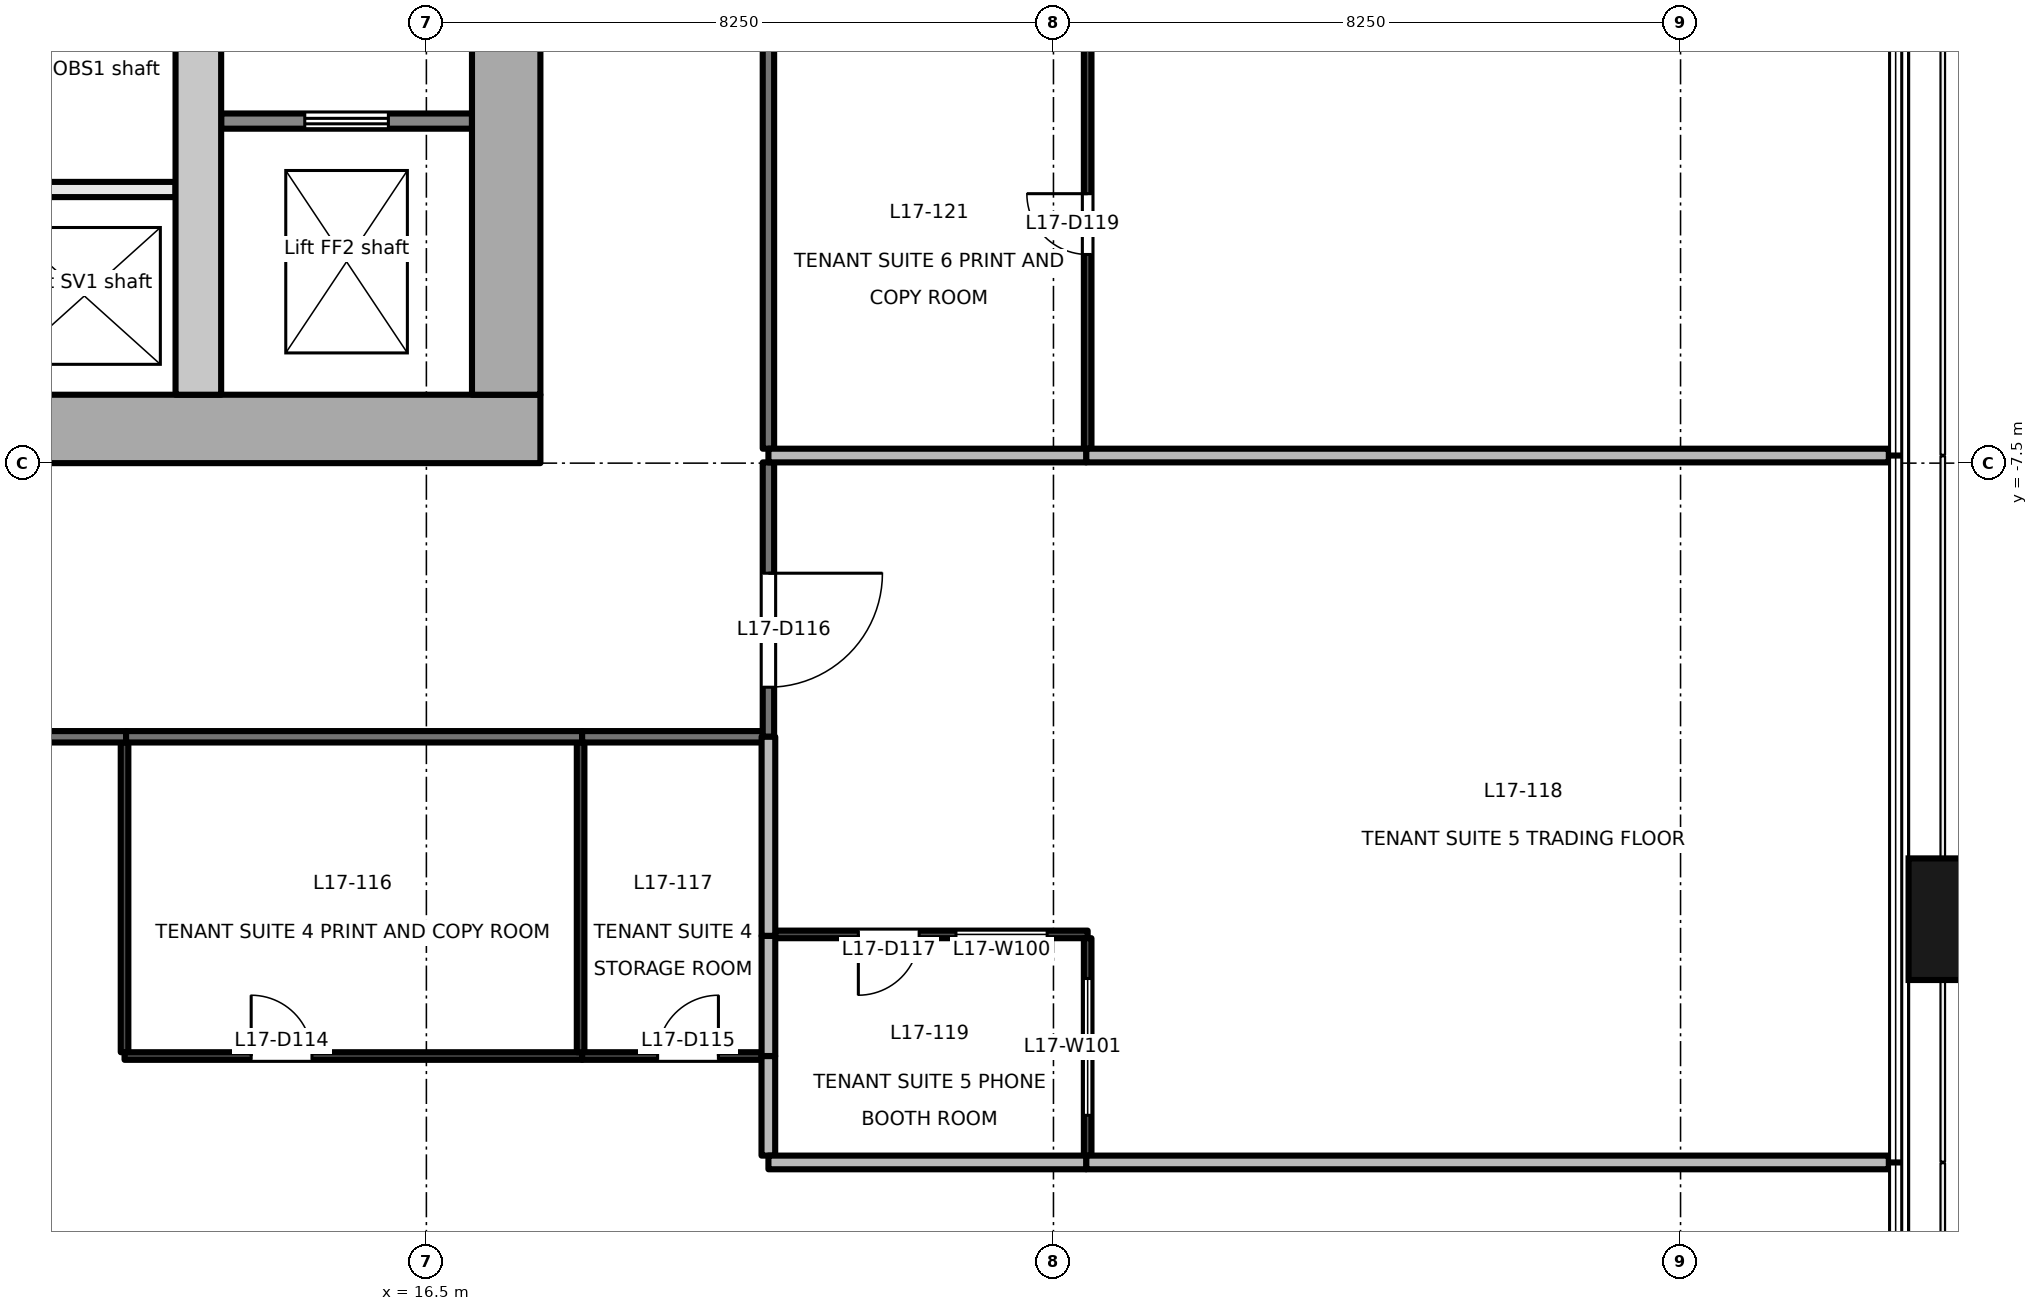
"""IFC4 building model, lengths in metres.
Left out: names, types, materials, properties, quantities, classifications, styles, units other than length and angle.
Written with IfcOpenShell. Run it as: python <this file> out.ifc"""

import sys

from ifc_helpers import new_model, si_unit, direction, frame, frame_2d, origin, origin_2d, place, context, subcontext, project, spatial, rectangle, extrude, element, fill, save


model = new_model("IFC4")
c1 = context("Model", 3, precision=1e-05, world=origin(), true_north=direction((0.0, 1.0)))
c2 = subcontext(c1, "Body", "Model", "MODEL_VIEW")
j1 = project(units=[si_unit("LENGTHUNIT", "METRE"), si_unit("PLANEANGLEUNIT", "RADIAN")], contexts=[c1])
p1 = place(None, origin())
s1 = spatial("IfcSite", under=j1, at=p1, CompositionType="ELEMENT")
p2 = place(p1, origin())
s2 = spatial("IfcBuilding", under=s1, at=p2, CompositionType="ELEMENT")
p3 = place(p2, frame((0.0, 0.0, 79.7)))
s3 = spatial("IfcBuildingStorey", under=s2, at=p3, CompositionType="ELEMENT", Elevation=79.7)
p4 = place(p3, frame((36.9, -13.5, -0.2), z_axis=(0.0, 0.0, 1.0), x_axis=(0.0, 1.0, 0.0)))
e1 = element("IfcColumn", 1, at=p4, inside=s3, PredefinedType="COLUMN", context=c2, shape_type="SweptSolid", body=[
    extrude(rectangle(XDim=1.6, YDim=1.8, at=origin_2d()), origin(), (0.0, 0.0, 1.0), 4.0),
])
p5 = place(p3, frame((-18.0, -7.05, -0.2), z_axis=(0.0, 0.0, 1.0), x_axis=(1.0, 0.0, 0.0)))
e2 = element("IfcWall", 2, at=p5, inside=s3, PredefinedType="SHEAR", context=c2, shape_type="SweptSolid", body=[
    extrude(rectangle(XDim=36.0, YDim=0.9, at=frame_2d((18.0, 0.0))), origin(), (0.0, 0.0, 1.0), 4.0),
])
p6 = place(p5, frame((7.8, 0.0, 0.2)))
e3 = element("IfcOpeningElement", 3, at=p6, cuts=e2, PredefinedType="OPENING", context=c2, shape_type="SweptSolid", body=[
    extrude(rectangle(XDim=2.4, YDim=2.1, at=frame_2d((1.2, 1.05))), frame((0.0, 0.46, 0.0), z_axis=(0.0, -1.0, 0.0), x_axis=(1.0, 0.0, 0.0)), (0.0, 0.0, 1.0), 0.921),
])
p7 = place(p5, frame((17.4, 0.0, 0.2)))
e4 = element("IfcOpeningElement", 4, at=p7, cuts=e2, PredefinedType="OPENING", context=c2, shape_type="SweptSolid", body=[
    extrude(rectangle(XDim=1.2, YDim=2.1, at=frame_2d((0.6, 1.05))), frame((0.0, 0.46, 0.0), z_axis=(0.0, -1.0, 0.0), x_axis=(1.0, 0.0, 0.0)), (0.0, 0.0, 1.0), 0.921),
])
p8 = place(p5, frame((26.1, 0.0, 0.2)))
e5 = element("IfcOpeningElement", 5, at=p8, cuts=e2, PredefinedType="OPENING", context=c2, shape_type="SweptSolid", body=[
    extrude(rectangle(XDim=2.4, YDim=2.1, at=frame_2d((1.2, 1.05))), frame((0.0, 0.46, 0.0), z_axis=(0.0, -1.0, 0.0), x_axis=(1.0, 0.0, 0.0)), (0.0, 0.0, 1.0), 0.921),
])
p9 = place(p3, frame((17.55, -6.6, -0.2), z_axis=(0.0, 0.0, 1.0), x_axis=(0.0, 1.0, 0.0)))
e6 = element("IfcWall", 6, at=p9, inside=s3, PredefinedType="SHEAR", context=c2, shape_type="SweptSolid", body=[
    extrude(rectangle(XDim=13.2, YDim=0.9, at=frame_2d((6.6, 0.0))), origin(), (0.0, 0.0, 1.0), 4.0),
])
p10 = place(p9, frame((4.55, 0.0, 0.2)))
e7 = element("IfcOpeningElement", 7, at=p10, cuts=e6, PredefinedType="OPENING", context=c2, shape_type="SweptSolid", body=[
    extrude(rectangle(XDim=1.2, YDim=2.1, at=frame_2d((0.6, 1.05))), frame((0.0, 0.46, 0.0), z_axis=(0.0, -1.0, 0.0), x_axis=(1.0, 0.0, 0.0)), (0.0, 0.0, 1.0), 0.921),
])
p11 = place(p3, frame((13.5, -6.6, -0.2), z_axis=(0.0, 0.0, 1.0), x_axis=(0.0, 1.0, 0.0)))
e8 = element("IfcWall", 8, at=p11, inside=s3, PredefinedType="SHEAR", context=c2, shape_type="SweptSolid", body=[
    extrude(rectangle(XDim=13.2, YDim=0.6, at=frame_2d((6.6, 0.0))), origin(), (0.0, 0.0, 1.0), 4.0),
])
p12 = place(p3, frame((13.8, -3.0, 0.0), z_axis=(0.0, 0.0, 1.0), x_axis=(1.0, 0.0, 0.0)))
e9 = element("IfcWall", 9, at=p12, inside=s3, PredefinedType="PARTITIONING", context=c2, shape_type="SweptSolid", body=[
    extrude(rectangle(XDim=3.3, YDim=0.2, at=frame_2d((1.65, 0.0))), origin(), (0.0, 0.0, 1.0), 3.8),
])
p13 = place(p12, frame((1.1, 0.0, 0.0)))
e10 = element("IfcOpeningElement", 10, at=p13, cuts=e9, PredefinedType="OPENING", context=c2, shape_type="SweptSolid", body=[
    extrude(rectangle(XDim=1.1, YDim=2.1, at=frame_2d((0.55, 1.05))), frame((0.0, 0.111, 0.0), z_axis=(0.0, -1.0, 0.0), x_axis=(1.0, 0.0, 0.0)), (0.0, 0.0, 1.0), 0.221),
])
p14 = place(p3, frame((10.9, -3.9, 0.0), z_axis=(0.0, 0.0, 1.0), x_axis=(1.0, 0.0, 0.0)))
e11 = element("IfcWall", 11, at=p14, inside=s3, PredefinedType="PARTITIONING", context=c2, shape_type="SweptSolid", body=[
    extrude(rectangle(XDim=2.3, YDim=0.2, at=frame_2d((1.15, 0.0))), origin(), (0.0, 0.0, 1.0), 3.8),
])
p15 = place(p3, frame((12.549, -11.1, 0.0), z_axis=(0.0, 0.0, 1.0), x_axis=(-1.0, 0.0, 0.0)))
e12 = element("IfcWall", 12, at=p15, inside=s3, PredefinedType="PARTITIONING", context=c2, shape_type="SweptSolid", body=[
    extrude(rectangle(XDim=6.04, YDim=0.15, at=frame_2d((3.02, 0.0))), origin(), (0.0, 0.0, 1.0), 2.8),
])
p16 = place(p15, frame((2.12, 0.0, 0.0)))
e13 = element("IfcOpeningElement", 13, at=p16, cuts=e12, PredefinedType="OPENING", context=c2, shape_type="SweptSolid", body=[
    extrude(rectangle(XDim=1.8, YDim=2.1, at=frame_2d((0.9, 1.05))), frame((0.0, 0.085, 0.0), z_axis=(0.0, -1.0, 0.0), x_axis=(1.0, 0.0, 0.0)), (0.0, 0.0, 1.0), 0.171),
])
p17 = place(p3, frame((18.549, -11.1, 0.0), z_axis=(0.0, 0.0, 1.0), x_axis=(-1.0, 0.0, 0.0)))
e14 = element("IfcWall", 14, at=p17, inside=s3, PredefinedType="PARTITIONING", context=c2, shape_type="SweptSolid", body=[
    extrude(rectangle(XDim=6.0, YDim=0.15, at=frame_2d((3.0, 0.0))), origin(), (0.0, 0.0, 1.0), 2.4),
])
p18 = place(p3, frame((20.925, -11.1, 0.0), z_axis=(0.0, 0.0, 1.0), x_axis=(-1.0, 0.0, 0.0)))
e15 = element("IfcWall", 15, at=p18, inside=s3, PredefinedType="PARTITIONING", context=c2, shape_type="SweptSolid", body=[
    extrude(rectangle(XDim=2.376, YDim=0.15, at=frame_2d((1.188, 0.0))), origin(), (0.0, 0.0, 1.0), 3.8),
])
p19 = place(p3, frame((21.0, -7.49, 0.0), z_axis=(0.0, 0.0, 1.0), x_axis=(0.0, -1.0, 0.0)))
e16 = element("IfcWall", 16, at=p19, inside=s3, PredefinedType="PARTITIONING", context=c2, shape_type="SweptSolid", body=[
    extrude(rectangle(XDim=3.61, YDim=0.15, at=frame_2d((1.805, 0.0))), origin(), (0.0, 0.0, 1.0), 2.9),
])
p20 = place(p19, frame((1.458, 0.0, 0.0)))
e17 = element("IfcOpeningElement", 17, at=p20, cuts=e16, PredefinedType="OPENING", context=c2, shape_type="SweptSolid", body=[
    extrude(rectangle(XDim=1.5, YDim=2.1, at=frame_2d((0.75, 1.05))), frame((0.0, 0.085, 0.0), z_axis=(0.0, -1.0, 0.0), x_axis=(1.0, 0.0, 0.0)), (0.0, 0.0, 1.0), 0.171),
])
p21 = place(p3, frame((21.0, -1.38, 0.0), z_axis=(0.0, 0.0, 1.0), x_axis=(0.0, -1.0, 0.0)))
e18 = element("IfcWall", 18, at=p21, inside=s3, PredefinedType="PARTITIONING", context=c2, shape_type="SweptSolid", body=[
    extrude(rectangle(XDim=5.93, YDim=0.15, at=frame_2d((2.965, 0.0))), origin(), (0.0, 0.0, 1.0), 2.9),
])
p22 = place(p3, frame((12.529, -11.175, 0.0), z_axis=(0.0, 0.0, 1.0), x_axis=(0.0, -1.0, 0.0)))
e19 = element("IfcWall", 19, at=p22, inside=s3, PredefinedType="PARTITIONING", context=c2, shape_type="SweptSolid", body=[
    extrude(rectangle(XDim=4.075, YDim=0.1, at=frame_2d((2.038, 0.0))), origin(), (0.0, 0.0, 1.0), 3.8),
])
p23 = place(p3, frame((12.529, -15.3, 0.0), z_axis=(0.0, 0.0, 1.0), x_axis=(1.0, 0.0, 0.0)))
e20 = element("IfcWall", 20, at=p23, inside=s3, PredefinedType="PARTITIONING", context=c2, shape_type="SweptSolid", body=[
    extrude(rectangle(XDim=6.02, YDim=0.1, at=frame_2d((3.01, 0.0))), origin(), (0.0, 0.0, 1.0), 2.4),
])
p24 = place(p23, frame((1.666, 0.0, 0.0)))
e21 = element("IfcOpeningElement", 21, at=p24, cuts=e20, PredefinedType="OPENING", context=c2, shape_type="SweptSolid", body=[
    extrude(rectangle(XDim=0.8, YDim=2.1, at=frame_2d((0.4, 1.05))), frame((0.0, 0.061, 0.0), z_axis=(0.0, -1.0, 0.0), x_axis=(1.0, 0.0, 0.0)), (0.0, 0.0, 1.0), 0.121),
])
p25 = place(p3, frame((18.549, -15.3, 0.0), z_axis=(0.0, 0.0, 1.0), x_axis=(1.0, 0.0, 0.0)))
e22 = element("IfcWall", 22, at=p25, inside=s3, PredefinedType="PARTITIONING", context=c2, shape_type="SweptSolid", body=[
    extrude(rectangle(XDim=2.361, YDim=0.1, at=frame_2d((1.18, 0.0))), origin(), (0.0, 0.0, 1.0), 3.8),
])
p26 = place(p25, frame((0.993, 0.0, 0.0)))
e23 = element("IfcOpeningElement", 23, at=p26, cuts=e22, PredefinedType="OPENING", context=c2, shape_type="SweptSolid", body=[
    extrude(rectangle(XDim=0.8, YDim=2.1, at=frame_2d((0.4, 1.05))), frame((0.0, 0.061, 0.0), z_axis=(0.0, -1.0, 0.0), x_axis=(1.0, 0.0, 0.0)), (0.0, 0.0, 1.0), 0.121),
])
p27 = place(p3, frame((25.18, -16.7, 0.0), z_axis=(0.0, 0.0, 1.0), x_axis=(1.0, 0.0, 0.0)))
e24 = element("IfcWall", 24, at=p27, inside=s3, PredefinedType="PARTITIONING", context=c2, shape_type="SweptSolid", body=[
    extrude(rectangle(XDim=10.56, YDim=0.18, at=frame_2d((5.28, 0.0))), origin(), (0.0, 0.0, 1.0), 3.8),
])
p28 = place(p3, frame((20.999, -15.3, 0.0), z_axis=(0.0, 0.0, 1.0), x_axis=(0.0, -1.0, 0.0)))
e25 = element("IfcWall", 25, at=p28, inside=s3, PredefinedType="PARTITIONING", context=c2, shape_type="SweptSolid", body=[
    extrude(rectangle(XDim=1.31, YDim=0.18, at=frame_2d((0.655, 0.0))), origin(), (0.0, 0.0, 1.0), 3.8),
])
p29 = place(p3, frame((21.0, -16.7, 0.0), z_axis=(0.0, 0.0, 1.0), x_axis=(1.0, 0.0, 0.0)))
e26 = element("IfcWall", 26, at=p29, inside=s3, PredefinedType="PARTITIONING", context=c2, shape_type="SweptSolid", body=[
    extrude(rectangle(XDim=4.18, YDim=0.18, at=frame_2d((2.09, 0.0))), origin(), (0.0, 0.0, 1.0), 3.8),
])
p30 = place(p3, frame((18.529, -11.175, 0.0), z_axis=(0.0, 0.0, 1.0), x_axis=(0.0, -1.0, 0.0)))
e27 = element("IfcWall", 27, at=p30, inside=s3, PredefinedType="PARTITIONING", context=c2, shape_type="SweptSolid", body=[
    extrude(rectangle(XDim=4.075, YDim=0.1, at=frame_2d((2.038, 0.0))), origin(), (0.0, 0.0, 1.0), 2.9),
])
p31 = place(p3, frame((21.0, -11.1, 0.0), z_axis=(0.0, 0.0, 1.0), x_axis=(0.0, -1.0, 0.0)))
e28 = element("IfcWall", 28, at=p31, inside=s3, PredefinedType="PARTITIONING", context=c2, shape_type="SweptSolid", body=[
    extrude(rectangle(XDim=2.62, YDim=0.18, at=frame_2d((1.31, 0.0))), origin(), (0.0, 0.0, 1.0), 2.9),
])
p32 = place(p3, frame((21.0, -13.72, 0.0), z_axis=(0.0, 0.0, 1.0), x_axis=(0.0, -1.0, 0.0)))
e29 = element("IfcWall", 29, at=p32, inside=s3, PredefinedType="PARTITIONING", context=c2, shape_type="SweptSolid", body=[
    extrude(rectangle(XDim=1.58, YDim=0.18, at=frame_2d((0.79, 0.0))), origin(), (0.0, 0.0, 1.0), 3.8),
])
p33 = place(p3, frame((25.2, -13.7, 0.0), z_axis=(0.0, 0.0, 1.0), x_axis=(-1.0, 0.0, 0.0)))
e30 = element("IfcWall", 30, at=p33, inside=s3, PredefinedType="PARTITIONING", context=c2, shape_type="SweptSolid", body=[
    extrude(rectangle(XDim=4.11, YDim=0.1, at=frame_2d((2.055, 0.0))), origin(), (0.0, 0.0, 1.0), 3.8),
])
p34 = place(p33, frame((2.217, 0.0, 0.0)))
e31 = element("IfcOpeningElement", 31, at=p34, cuts=e30, PredefinedType="OPENING", context=c2, shape_type="SweptSolid", body=[
    extrude(rectangle(XDim=0.8, YDim=2.1, at=frame_2d((0.4, 1.05))), frame((0.0, 0.061, 0.0), z_axis=(0.0, -1.0, 0.0), x_axis=(1.0, 0.0, 0.0)), (0.0, 0.0, 1.0), 0.121),
])
p35 = place(p33, frame((0.533, 0.0, 0.9)))
e32 = element("IfcOpeningElement", 32, at=p35, cuts=e30, PredefinedType="OPENING", context=c2, shape_type="SweptSolid", body=[
    extrude(rectangle(XDim=1.2, YDim=1.2, at=frame_2d((0.6, 0.6))), frame((0.0, 0.061, 0.0), z_axis=(0.0, -1.0, 0.0), x_axis=(1.0, 0.0, 0.0)), (0.0, 0.0, 1.0), 0.121),
])
p36 = place(p3, frame((25.2, -16.61, 0.0), z_axis=(0.0, 0.0, 1.0), x_axis=(0.0, 1.0, 0.0)))
e33 = element("IfcWall", 33, at=p36, inside=s3, PredefinedType="PARTITIONING", context=c2, shape_type="SweptSolid", body=[
    extrude(rectangle(XDim=2.86, YDim=0.1, at=frame_2d((1.43, 0.0))), origin(), (0.0, 0.0, 1.0), 3.8),
])
p37 = place(p36, frame((0.53, 0.0, 0.9)))
e34 = element("IfcOpeningElement", 34, at=p37, cuts=e33, PredefinedType="OPENING", context=c2, shape_type="SweptSolid", body=[
    extrude(rectangle(XDim=1.8, YDim=1.2, at=frame_2d((0.9, 0.6))), frame((0.0, 0.061, 0.0), z_axis=(0.0, -1.0, 0.0), x_axis=(1.0, 0.0, 0.0)), (0.0, 0.0, 1.0), 0.121),
])
p38 = place(p3, frame((25.18, -7.4, 0.0), z_axis=(0.0, 0.0, 1.0), x_axis=(1.0, 0.0, 0.0)))
e35 = element("IfcWall", 35, at=p38, inside=s3, PredefinedType="PARTITIONING", context=c2, shape_type="SweptSolid", body=[
    extrude(rectangle(XDim=10.56, YDim=0.18, at=frame_2d((5.28, 0.0))), origin(), (0.0, 0.0, 1.0), 3.8),
])
p39 = place(p3, frame((21.0, -7.4, 0.0), z_axis=(0.0, 0.0, 1.0), x_axis=(1.0, 0.0, 0.0)))
e36 = element("IfcWall", 36, at=p39, inside=s3, PredefinedType="PARTITIONING", context=c2, shape_type="SweptSolid", body=[
    extrude(rectangle(XDim=4.18, YDim=0.18, at=frame_2d((2.09, 0.0))), origin(), (0.0, 0.0, 1.0), 3.8),
])
p40 = place(p3, frame((25.2, -7.31, 0.0), z_axis=(0.0, 0.0, 1.0), x_axis=(0.0, 1.0, 0.0)))
e37 = element("IfcWall", 37, at=p40, inside=s3, PredefinedType="PARTITIONING", context=c2, shape_type="SweptSolid", body=[
    extrude(rectangle(XDim=5.91, YDim=0.1, at=frame_2d((2.955, 0.0))), origin(), (0.0, 0.0, 1.0), 2.9),
])
p41 = place(p40, frame((2.555, 0.0, 0.0)))
e38 = element("IfcOpeningElement", 38, at=p41, cuts=e37, PredefinedType="OPENING", context=c2, shape_type="SweptSolid", body=[
    extrude(rectangle(XDim=0.8, YDim=2.1, at=frame_2d((0.4, 1.05))), frame((0.0, 0.061, 0.0), z_axis=(0.0, -1.0, 0.0), x_axis=(1.0, 0.0, 0.0)), (0.0, 0.0, 1.0), 0.121),
])
p42 = place(p13, origin())
e39 = element("IfcDoor", 39, at=p42, inside=s3, OperationType="DOUBLE_DOOR_SLIDING", PredefinedType="DOOR", context=c2, shape_type="SweptSolid", body=[
    extrude(rectangle(XDim=1.1, YDim=2.1, at=frame_2d((0.55, 1.05))), frame((0.0, 0.025, 0.0), z_axis=(0.0, -1.0, 0.0), x_axis=(1.0, 0.0, 0.0)), (0.0, 0.0, 1.0), 0.05),
])
fill(e10, e39)
p43 = place(p24, origin())
e40 = element("IfcDoor", 40, at=p43, inside=s3, OperationType="SINGLE_SWING_LEFT", PredefinedType="DOOR", context=c2, shape_type="SweptSolid", body=[
    extrude(rectangle(XDim=0.8, YDim=2.1, at=frame_2d((0.4, 1.05))), frame((0.0, 0.025, 0.0), z_axis=(0.0, -1.0, 0.0), x_axis=(1.0, 0.0, 0.0)), (0.0, 0.0, 1.0), 0.05),
])
fill(e21, e40)
p44 = place(p26, origin())
e41 = element("IfcDoor", 41, at=p44, inside=s3, OperationType="SINGLE_SWING_RIGHT", PredefinedType="DOOR", context=c2, shape_type="SweptSolid", body=[
    extrude(rectangle(XDim=0.8, YDim=2.1, at=frame_2d((0.4, 1.05))), frame((0.0, 0.025, 0.0), z_axis=(0.0, -1.0, 0.0), x_axis=(1.0, 0.0, 0.0)), (0.0, 0.0, 1.0), 0.05),
])
fill(e23, e41)
p45 = place(p20, origin())
e42 = element("IfcDoor", 42, at=p45, inside=s3, OperationType="DOUBLE_DOOR_SINGLE_SWING", PredefinedType="DOOR", context=c2, shape_type="SweptSolid", body=[
    extrude(rectangle(XDim=1.5, YDim=2.1, at=frame_2d((0.75, 1.05))), frame((0.0, 0.025, 0.0), z_axis=(0.0, -1.0, 0.0), x_axis=(1.0, 0.0, 0.0)), (0.0, 0.0, 1.0), 0.05),
])
fill(e17, e42)
p46 = place(p34, origin())
e43 = element("IfcDoor", 43, at=p46, inside=s3, OperationType="SINGLE_SWING_RIGHT", PredefinedType="DOOR", context=c2, shape_type="SweptSolid", body=[
    extrude(rectangle(XDim=0.8, YDim=2.1, at=frame_2d((0.4, 1.05))), frame((0.0, 0.025, 0.0), z_axis=(0.0, -1.0, 0.0), x_axis=(1.0, 0.0, 0.0)), (0.0, 0.0, 1.0), 0.05),
])
fill(e31, e43)
p47 = place(p41, origin())
e44 = element("IfcDoor", 44, at=p47, inside=s3, OperationType="SINGLE_SWING_RIGHT", PredefinedType="DOOR", context=c2, shape_type="SweptSolid", body=[
    extrude(rectangle(XDim=0.8, YDim=2.1, at=frame_2d((0.4, 1.05))), frame((0.0, 0.025, 0.0), z_axis=(0.0, -1.0, 0.0), x_axis=(1.0, 0.0, 0.0)), (0.0, 0.0, 1.0), 0.05),
])
fill(e38, e44)
p48 = place(p35, origin())
e45 = element("IfcWindow", 45, at=p48, inside=s3, PartitioningType="SINGLE_PANEL", PredefinedType="WINDOW", context=c2, shape_type="SweptSolid", body=[
    extrude(rectangle(XDim=1.2, YDim=1.2, at=frame_2d((0.6, 0.6))), frame((0.0, 0.03, 0.0), z_axis=(0.0, -1.0, 0.0), x_axis=(1.0, 0.0, 0.0)), (0.0, 0.0, 1.0), 0.06),
])
fill(e32, e45)
p49 = place(p37, origin())
e46 = element("IfcWindow", 46, at=p49, inside=s3, PartitioningType="SINGLE_PANEL", PredefinedType="WINDOW", context=c2, shape_type="SweptSolid", body=[
    extrude(rectangle(XDim=1.8, YDim=1.2, at=frame_2d((0.9, 0.6))), frame((0.0, 0.03, 0.0), z_axis=(0.0, -1.0, 0.0), x_axis=(1.0, 0.0, 0.0)), (0.0, 0.0, 1.0), 0.06),
])
fill(e34, e46)
save(model, sys.argv[1])
